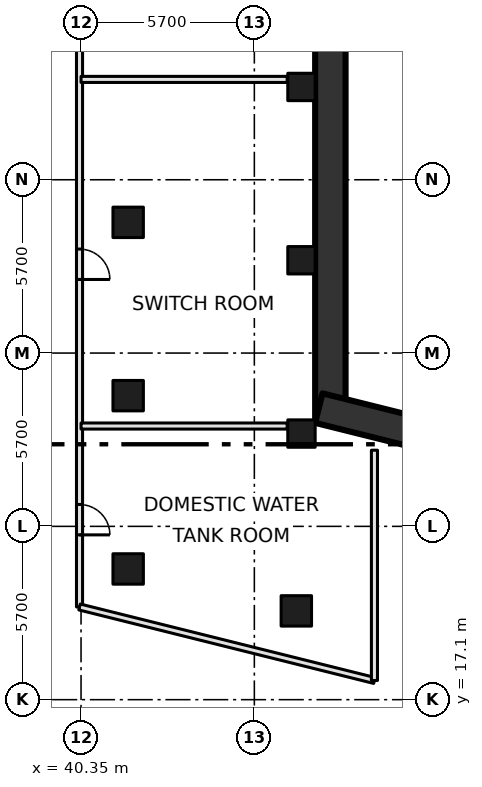
"""IFC4 building model, lengths in metres.
Left out: names, types, materials, properties, quantities, classifications, styles, units other than length and angle.
Written with IfcOpenShell. Run it as: python <this file> out.ifc"""

import sys

from ifc_helpers import new_model, si_unit, direction, frame, frame_2d, origin, origin_2d, place, context, subcontext, project, spatial, rectangle, extrude, element, fill, save


model = new_model("IFC4")
c1 = context("Model", 3, precision=1e-05, world=origin(), true_north=direction((0.0, 1.0)))
c2 = subcontext(c1, "Body", "Model", "MODEL_VIEW")
j1 = project(units=[si_unit("LENGTHUNIT", "METRE"), si_unit("PLANEANGLEUNIT", "RADIAN")], contexts=[c1])
p1 = place(None, origin())
s1 = spatial("IfcSite", under=j1, at=p1, CompositionType="ELEMENT")
p2 = place(p1, origin())
s2 = spatial("IfcBuilding", under=s1, at=p2, CompositionType="ELEMENT")
p3 = place(p2, frame((0.0, 0.0, -9.0)))
s3 = spatial("IfcBuildingStorey", under=s2, at=p3, CompositionType="ELEMENT", Elevation=-9.0)
p4 = place(p3, frame((48.55, 42.797, -0.4), z_axis=(0.0, 0.0, 1.0), x_axis=(0.0, -1.0, 0.0)))
e1 = element("IfcWall", 1, at=p4, inside=s3, PredefinedType="SOLIDWALL", context=c2, shape_type="SweptSolid", body=[
    extrude(rectangle(XDim=16.593, YDim=1.0, at=frame_2d((8.296, 0.0))), origin(), (0.0, 0.0, 1.0), 4.9),
])
p5 = place(p3, frame((48.171, 26.689, -0.4), z_axis=(0.0, 0.0, 1.0), x_axis=(0.970293913122, -0.241929167647, 0.0)))
e2 = element("IfcWall", 2, at=p5, inside=s3, PredefinedType="SOLIDWALL", context=c2, shape_type="SweptSolid", body=[
    extrude(rectangle(XDim=51.533, YDim=1.0, at=frame_2d((25.766, 0.0))), origin(), (0.0, 0.0, 1.0), 4.9),
])
for number, where, z_axis, x_axis in (
    (3, (41.9, 21.399, 0.0), (0.0, 0.0, 1.0), (1.0, 0.0, 0.0)),
    (4, (47.431, 20.02, 0.0), (0.0, 0.0, 1.0), (1.0, 0.0, 0.0)),
    (5, (41.9, 27.099, 0.0), (0.0, 0.0, 1.0), (1.0, 0.0, 0.0)),
    (6, (41.9, 32.799, 0.0), (0.0, 0.0, 1.0), (1.0, 0.0, 0.0)),
):
    element("IfcColumn", number, at=place(p3, frame(where, z_axis=z_axis, x_axis=x_axis)), inside=s3, PredefinedType="COLUMN", context=c2, shape_type="SweptSolid", body=[
        extrude(rectangle(XDim=1.0, YDim=1.0, at=origin_2d()), origin(), (0.0, 0.0, 1.0), 4.5),
    ])
for number, where, z_axis, x_axis in (
    (7, (47.6, 25.852, 0.0), (0.0, 0.0, 1.0), (1.0, 0.0, 0.0)),
    (8, (47.6, 31.552, 0.0), (0.0, 0.0, 1.0), (1.0, 0.0, 0.0)),
    (9, (47.6, 37.252, 0.0), (0.0, 0.0, 1.0), (1.0, 0.0, 0.0)),
):
    element("IfcColumn", number, at=place(p3, frame(where, z_axis=z_axis, x_axis=x_axis)), inside=s3, PredefinedType="COLUMN", context=c2, shape_type="SweptSolid", body=[
        extrude(rectangle(XDim=0.9, YDim=0.9, at=origin_2d()), origin(), (0.0, 0.0, 1.0), 4.5),
    ])
p6 = place(p3, frame((40.3, 39.172, 0.0), z_axis=(0.0, 0.0, 1.0), x_axis=(0.0, -1.0, 0.0)))
e10 = element("IfcWall", 10, at=p6, inside=s3, PredefinedType="PARTITIONING", context=c2, shape_type="SweptSolid", body=[
    extrude(rectangle(XDim=19.023, YDim=0.2, at=frame_2d((9.512, 0.0))), origin(), (0.0, 0.0, 1.0), 4.05),
])
p7 = place(p6, frame((15.652, 0.0, 0.0)))
e11 = element("IfcOpeningElement", 11, at=p7, cuts=e10, PredefinedType="OPENING", context=c2, shape_type="SweptSolid", body=[
    extrude(rectangle(XDim=1.0, YDim=2.1, at=frame_2d((0.5, 1.05))), frame((0.0, 0.11, 0.0), z_axis=(0.0, -1.0, 0.0), x_axis=(1.0, 0.0, 0.0)), (0.0, 0.0, 1.0), 0.22),
])
p8 = place(p6, frame((7.252, 0.0, 0.0)))
e12 = element("IfcOpeningElement", 12, at=p8, cuts=e10, PredefinedType="OPENING", context=c2, shape_type="SweptSolid", body=[
    extrude(rectangle(XDim=1.0, YDim=2.1, at=frame_2d((0.5, 1.05))), frame((0.0, 0.11, 0.0), z_axis=(0.0, -1.0, 0.0), x_axis=(1.0, 0.0, 0.0)), (0.0, 0.0, 1.0), 0.22),
])
p9 = place(p3, frame((50.0, 17.731, 0.0), z_axis=(0.0, 0.0, 1.0), x_axis=(-0.970307482214, 0.241874740224, 0.0)))
e13 = element("IfcWall", 13, at=p9, inside=s3, PredefinedType="PARTITIONING", context=c2, shape_type="SweptSolid", body=[
    extrude(rectangle(XDim=9.997, YDim=0.2, at=frame_2d((4.999, 0.0))), origin(), (0.0, 0.0, 1.0), 4.05),
])
p10 = place(p3, frame((50.0, 25.305, 0.0), z_axis=(0.0, 0.0, 1.0), x_axis=(0.0, -1.0, 0.0)))
e14 = element("IfcWall", 14, at=p10, inside=s3, PredefinedType="PARTITIONING", context=c2, shape_type="SweptSolid", body=[
    extrude(rectangle(XDim=7.574, YDim=0.2, at=frame_2d((3.787, 0.0))), origin(), (0.0, 0.0, 1.0), 4.05),
])
for number, where, z_axis, x_axis in (
    (15, (47.13, 26.1, 0.0), (0.0, 0.0, 1.0), (-1.0, 0.0, 0.0)),
    (16, (47.13, 37.5, 0.0), (0.0, 0.0, 1.0), (-1.0, 0.0, 0.0)),
):
    element("IfcWall", number, at=place(p3, frame(where, z_axis=z_axis, x_axis=x_axis)), inside=s3, PredefinedType="PARTITIONING", context=c2, shape_type="SweptSolid", body=[
        extrude(rectangle(XDim=6.78, YDim=0.2, at=frame_2d((3.39, 0.0))), origin(), (0.0, 0.0, 1.0), 4.05),
    ])
p11 = place(p7, origin())
e17 = element("IfcDoor", 17, at=p11, inside=s3, OperationType="SINGLE_SWING_RIGHT", PredefinedType="DOOR", context=c2, shape_type="SweptSolid", body=[
    extrude(rectangle(XDim=1.0, YDim=2.1, at=frame_2d((0.5, 1.05))), frame((0.0, 0.025, 0.0), z_axis=(0.0, -1.0, 0.0), x_axis=(1.0, 0.0, 0.0)), (0.0, 0.0, 1.0), 0.05),
])
fill(e11, e17)
p12 = place(p8, origin())
e18 = element("IfcDoor", 18, at=p12, inside=s3, OperationType="SINGLE_SWING_RIGHT", PredefinedType="DOOR", context=c2, shape_type="SweptSolid", body=[
    extrude(rectangle(XDim=1.0, YDim=2.1, at=frame_2d((0.5, 1.05))), frame((0.0, 0.025, 0.0), z_axis=(0.0, -1.0, 0.0), x_axis=(1.0, 0.0, 0.0)), (0.0, 0.0, 1.0), 0.05),
])
fill(e12, e18)
save(model, sys.argv[1])
